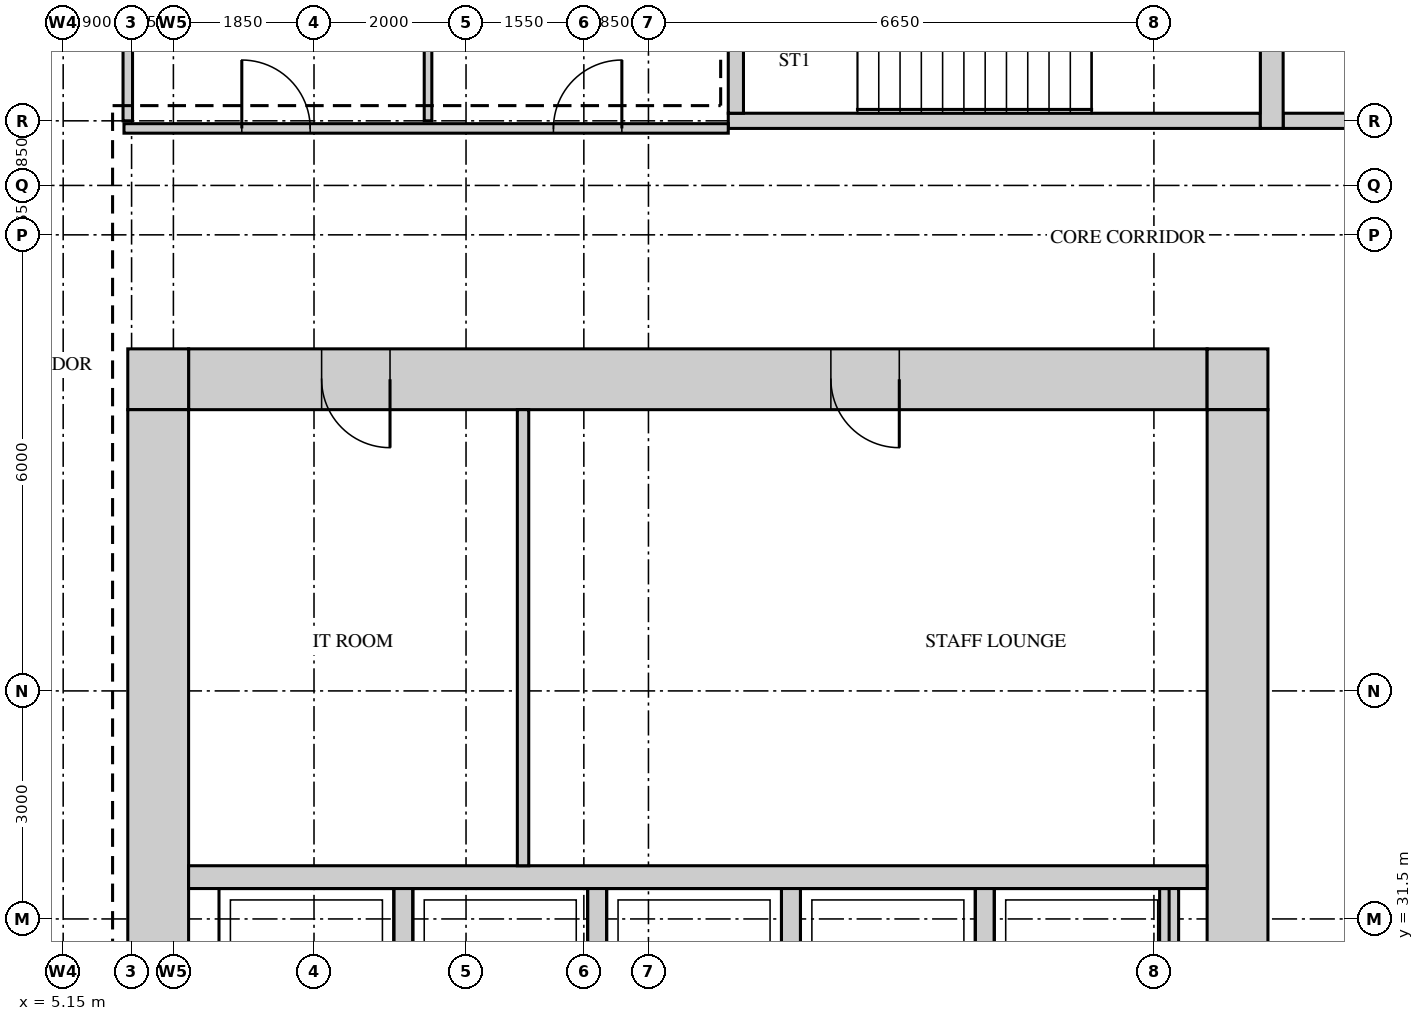
"""IFC4 building model, lengths in metres.
Left out: names, types, materials, properties, quantities, classifications, styles, units other than length and angle.
Written with IfcOpenShell. Run it as: python <this file> out.ifc"""

import sys

from ifc_helpers import new_model, si_unit, direction, frame, frame_2d, origin, place, context, subcontext, project, spatial, rectangle, extrude, source, transform, mapped, element, fill, save


model = new_model("IFC4")
c1 = context("Model", 3, precision=1e-05, world=origin(), true_north=direction((0.0, 1.0)))
c2 = subcontext(c1, "Body", "Model", "MODEL_VIEW")
j1 = project(units=[si_unit("LENGTHUNIT", "METRE"), si_unit("PLANEANGLEUNIT", "RADIAN")], contexts=[c1])
p1 = place(None, origin())
s1 = spatial("IfcSite", under=j1, at=p1, CompositionType="ELEMENT")
p2 = place(p1, origin())
s2 = spatial("IfcBuilding", under=s1, at=p2, CompositionType="ELEMENT")
p3 = place(p2, frame((0.0, 0.0, 192.7)))
s3 = spatial("IfcBuildingStorey", under=s2, at=p3, CompositionType="ELEMENT", Elevation=192.7)
m1 = source(origin(), c2, "Body", "SweptSolid", [
    extrude(rectangle(XDim=13.4, YDim=0.8, at=frame_2d((6.7, 0.0))), origin(), (0.0, 0.0, 1.0), 3.75),
])
p4 = place(p3, frame((6.8, 38.6, 0.0), z_axis=(0.0, 0.0, 1.0), x_axis=(1.0, 0.0, 0.0)))
e1 = element("IfcWall", 1, at=p4, inside=s3, PredefinedType="SHEAR", context=c2, shape_type="MappedRepresentation", body=[
    mapped(m1, transform((0.0, 0.0, 0.0))),
])
m2 = source(origin(), c2, "Body", "SweptSolid", [
    extrude(rectangle(XDim=0.9, YDim=2.1, at=frame_2d((0.45, 1.05))), frame((0.0, 0.41, 0.0), z_axis=(0.0, -1.0, 0.0), x_axis=(1.0, 0.0, 0.0)), (0.0, 0.0, 1.0), 0.82),
])
p5 = place(p4, frame((1.75, 0.0, 0.0)))
e2 = element("IfcOpeningElement", 2, at=p5, cuts=e1, PredefinedType="OPENING", context=c2, shape_type="MappedRepresentation", body=[
    mapped(m2, transform((0.0, 0.0, 0.0))),
])
p6 = place(p4, frame((8.45, 0.0, 0.0)))
e3 = element("IfcOpeningElement", 3, at=p6, cuts=e1, PredefinedType="OPENING", context=c2, shape_type="MappedRepresentation", body=[
    mapped(m2, transform((0.0, 0.0, 0.0))),
])
m3 = source(origin(), c2, "Body", "SweptSolid", [
    extrude(rectangle(XDim=0.8, YDim=0.8, at=frame_2d((0.4, 0.0))), origin(), (0.0, 0.0, 1.0), 3.75),
])
for number, where, z_axis, x_axis in (
    (4, (20.2, 38.6, 0.0), (0.0, 0.0, 1.0), (1.0, 0.0, 0.0)),
    (5, (6.0, 38.6, 0.0), (0.0, 0.0, 1.0), (1.0, 0.0, 0.0)),
):
    element("IfcWall", number, at=place(p3, frame(where, z_axis=z_axis, x_axis=x_axis)), inside=s3, PredefinedType="SHEAR", context=c2, shape_type="MappedRepresentation", body=[
        mapped(m3, transform((0.0, 0.0, 0.0))),
    ])
m4 = source(origin(), c2, "Body", "SweptSolid", [
    extrude(rectangle(XDim=22.4, YDim=0.8, at=frame_2d((11.2, 0.0))), origin(), (0.0, 0.0, 1.0), 3.75),
])
p7 = place(p3, frame((20.6, 15.8, 0.0), z_axis=(0.0, 0.0, 1.0), x_axis=(0.0, 1.0, 0.0)))
e6 = element("IfcWall", 6, at=p7, inside=s3, PredefinedType="SHEAR", context=c2, shape_type="MappedRepresentation", body=[
    mapped(m4, transform((0.0, 0.0, 0.0))),
])
m5 = source(origin(), c2, "Body", "SweptSolid", [
    extrude(rectangle(XDim=1.8, YDim=2.1, at=frame_2d((0.9, 1.05))), frame((0.0, 0.41, 0.0), z_axis=(0.0, -1.0, 0.0), x_axis=(1.0, 0.0, 0.0)), (0.0, 0.0, 1.0), 0.82),
])
p8 = place(p7, frame((10.7, 0.0, 0.0)))
e7 = element("IfcOpeningElement", 7, at=p8, cuts=e6, PredefinedType="OPENING", context=c2, shape_type="MappedRepresentation", body=[
    mapped(m5, transform((0.0, 0.0, 0.0))),
])
p9 = place(p7, frame((0.35, 0.0, 0.0)))
e8 = element("IfcOpeningElement", 8, at=p9, cuts=e6, PredefinedType="OPENING", context=c2, shape_type="MappedRepresentation", body=[
    mapped(m2, transform((0.0, 0.0, 0.0))),
])
p10 = place(p7, frame((2.15, 0.0, 0.0)))
e9 = element("IfcOpeningElement", 9, at=p10, cuts=e6, PredefinedType="OPENING", context=c2, shape_type="MappedRepresentation", body=[
    mapped(m2, transform((0.0, 0.0, 0.0))),
])
m6 = source(origin(), c2, "Body", "SweptSolid", [
    extrude(rectangle(XDim=1.0, YDim=2.1, at=frame_2d((0.5, 1.05))), frame((0.0, 0.41, 0.0), z_axis=(0.0, -1.0, 0.0), x_axis=(1.0, 0.0, 0.0)), (0.0, 0.0, 1.0), 0.82),
])
p11 = place(p7, frame((4.85, 0.0, 0.0)))
e10 = element("IfcOpeningElement", 10, at=p11, cuts=e6, PredefinedType="OPENING", context=c2, shape_type="MappedRepresentation", body=[
    mapped(m6, transform((0.0, 0.0, 0.0))),
])
p12 = place(p3, frame((6.4, 15.8, 0.0), z_axis=(0.0, 0.0, 1.0), x_axis=(0.0, 1.0, 0.0)))
e11 = element("IfcWall", 11, at=p12, inside=s3, PredefinedType="SHEAR", context=c2, shape_type="MappedRepresentation", body=[
    mapped(m4, transform((0.0, 0.0, 0.0))),
])
m7 = source(origin(), c2, "Body", "SweptSolid", [
    extrude(rectangle(XDim=7.0, YDim=0.2, at=frame_2d((3.5, 0.0))), origin(), (0.0, 0.0, 1.0), 3.75),
])
p13 = place(p3, frame((13.9, 42.0, 0.0), z_axis=(0.0, 0.0, 1.0), x_axis=(1.0, 0.0, 0.0)))
e12 = element("IfcWall", 12, at=p13, inside=s3, PredefinedType="SHEAR", context=c2, shape_type="MappedRepresentation", body=[
    mapped(m7, transform((0.0, 0.0, 0.0))),
])
m8 = source(origin(), c2, "Body", "SweptSolid", [
    extrude(rectangle(XDim=7.1, YDim=0.2, at=frame_2d((3.55, 0.0))), origin(), (0.0, 0.0, 1.0), 3.75),
])
p14 = place(p3, frame((21.2, 42.0, 0.0), z_axis=(0.0, 0.0, 1.0), x_axis=(1.0, 0.0, 0.0)))
e13 = element("IfcWall", 13, at=p14, inside=s3, PredefinedType="SHEAR", context=c2, shape_type="MappedRepresentation", body=[
    mapped(m8, transform((0.0, 0.0, 0.0))),
])
m9 = source(origin(), c2, "Body", "SweptSolid", [
    extrude(rectangle(XDim=3.75, YDim=0.3, at=frame_2d((1.875, 0.0))), origin(), (0.0, 0.0, 1.0), 3.75),
])
p15 = place(p3, frame((21.05, 41.9, 0.0), z_axis=(0.0, 0.0, 1.0), x_axis=(0.0, 1.0, 0.0)))
e14 = element("IfcWall", 14, at=p15, inside=s3, PredefinedType="SHEAR", context=c2, shape_type="MappedRepresentation", body=[
    mapped(m9, transform((0.0, 0.0, 0.0))),
])
m10 = source(origin(), c2, "Body", "SweptSolid", [
    extrude(rectangle(XDim=3.35, YDim=0.2, at=frame_2d((1.675, 0.0))), origin(), (0.0, 0.0, 1.0), 3.75),
])
p16 = place(p3, frame((14.0, 42.1, 0.0), z_axis=(0.0, 0.0, 1.0), x_axis=(0.0, 1.0, 0.0)))
e15 = element("IfcWall", 15, at=p16, inside=s3, PredefinedType="SHEAR", context=c2, shape_type="MappedRepresentation", body=[
    mapped(m10, transform((0.0, 0.0, 0.0))),
])
m11 = source(origin(), c2, "Body", "SweptSolid", [
    extrude(rectangle(XDim=13.4, YDim=0.3, at=frame_2d((6.7, 0.0))), origin(), (0.0, 0.0, 1.0), 3.75),
])
p17 = place(p3, frame((6.8, 32.05, 0.0), z_axis=(0.0, 0.0, 1.0), x_axis=(1.0, 0.0, 0.0)))
e16 = element("IfcWall", 16, at=p17, inside=s3, PredefinedType="STANDARD", context=c2, shape_type="MappedRepresentation", body=[
    mapped(m11, transform((0.0, 0.0, 0.0))),
])
m12 = source(origin(), c2, "Body", "SweptSolid", [
    extrude(rectangle(XDim=2.4, YDim=0.25, at=frame_2d((1.2, 0.0))), origin(), (0.0, 0.0, 1.0), 3.75),
])
for number, where, z_axis, x_axis in (
    (17, (17.275, 29.5, 0.0), (0.0, 0.0, 1.0), (0.0, 1.0, 0.0)),
    (18, (19.7, 29.5, 0.0), (0.0, 0.0, 1.0), (0.0, 1.0, 0.0)),
    (19, (9.625, 29.5, 0.0), (0.0, 0.0, 1.0), (0.0, 1.0, 0.0)),
    (20, (12.175, 29.5, 0.0), (0.0, 0.0, 1.0), (0.0, 1.0, 0.0)),
    (21, (14.725, 29.5, 0.0), (0.0, 0.0, 1.0), (0.0, 1.0, 0.0)),
):
    element("IfcWall", number, at=place(p3, frame(where, z_axis=z_axis, x_axis=x_axis)), inside=s3, PredefinedType="STANDARD", context=c2, shape_type="MappedRepresentation", body=[
        mapped(m12, transform((0.0, 0.0, 0.0))),
    ])
m13 = source(origin(), c2, "Body", "SweptSolid", [
    extrude(rectangle(XDim=6.0, YDim=0.15, at=frame_2d((3.0, 0.0))), origin(), (0.0, 0.0, 1.0), 3.8),
])
p18 = place(p3, frame((11.2, 32.2, 0.0), z_axis=(0.0, 0.0, 1.0), x_axis=(0.0, 1.0, 0.0)))
e22 = element("IfcWall", 22, at=p18, inside=s3, PredefinedType="PARTITIONING", context=c2, shape_type="MappedRepresentation", body=[
    mapped(m13, transform((0.0, 0.0, 0.0))),
])
m14 = source(origin(), c2, "Body", "SweptSolid", [
    extrude(rectangle(XDim=7.95, YDim=0.125, at=frame_2d((3.975, 0.0))), origin(), (0.0, 0.0, 1.0), 3.8),
])
p19 = place(p3, frame((5.95, 41.9, 0.0), z_axis=(0.0, 0.0, 1.0), x_axis=(1.0, 0.0, 0.0)))
e23 = element("IfcWall", 23, at=p19, inside=s3, PredefinedType="PARTITIONING", context=c2, shape_type="MappedRepresentation", body=[
    mapped(m14, transform((0.0, 0.0, 0.0))),
])
m15 = source(origin(), c2, "Body", "SweptSolid", [
    extrude(rectangle(XDim=0.9, YDim=2.1, at=frame_2d((0.45, 1.05))), frame((0.0, 0.073, 0.0), z_axis=(0.0, -1.0, 0.0), x_axis=(1.0, 0.0, 0.0)), (0.0, 0.0, 1.0), 0.145),
])
p20 = place(p19, frame((1.55, 0.0, 0.0)))
e24 = element("IfcOpeningElement", 24, at=p20, cuts=e23, PredefinedType="OPENING", context=c2, shape_type="MappedRepresentation", body=[
    mapped(m15, transform((0.0, 0.0, 0.0))),
])
p21 = place(p19, frame((5.65, 0.0, 0.0)))
e25 = element("IfcOpeningElement", 25, at=p21, cuts=e23, PredefinedType="OPENING", context=c2, shape_type="MappedRepresentation", body=[
    mapped(m15, transform((0.0, 0.0, 0.0))),
])
m16 = source(origin(), c2, "Body", "SweptSolid", [
    extrude(rectangle(XDim=3.45, YDim=0.125, at=frame_2d((1.725, 0.0))), origin(), (0.0, 0.0, 1.0), 3.8),
])
p22 = place(p3, frame((6.0, 42.0, 0.0), z_axis=(0.0, 0.0, 1.0), x_axis=(0.0, 1.0, 0.0)))
e26 = element("IfcWall", 26, at=p22, inside=s3, PredefinedType="PARTITIONING", context=c2, shape_type="MappedRepresentation", body=[
    mapped(m16, transform((0.0, 0.0, 0.0))),
])
m17 = source(origin(), c2, "Body", "SweptSolid", [
    extrude(rectangle(XDim=3.45, YDim=0.1, at=frame_2d((1.725, 0.0))), origin(), (0.0, 0.0, 1.0), 3.8),
])
p23 = place(p3, frame((9.95, 42.0, 0.0), z_axis=(0.0, 0.0, 1.0), x_axis=(0.0, 1.0, 0.0)))
e27 = element("IfcWall", 27, at=p23, inside=s3, PredefinedType="PARTITIONING", context=c2, shape_type="MappedRepresentation", body=[
    mapped(m17, transform((0.0, 0.0, 0.0))),
])
m18 = source(origin(), c2, "Body", "SweptSolid", [
    extrude(rectangle(XDim=0.9, YDim=2.1, at=frame_2d((0.45, 1.05))), frame((0.0, 0.35, 0.0), z_axis=(0.0, -1.0, 0.0), x_axis=(1.0, 0.0, 0.0)), (0.0, 0.0, 1.0), 0.7),
])
p24 = place(p5, origin())
e28 = element("IfcDoor", 28, at=p24, inside=s3, OperationType="SINGLE_SWING_RIGHT", PredefinedType="DOOR", context=c2, shape_type="MappedRepresentation", body=[
    mapped(m18, transform((0.0, 0.0, 0.0))),
])
fill(e2, e28)
p25 = place(p6, origin())
e29 = element("IfcDoor", 29, at=p25, inside=s3, OperationType="SINGLE_SWING_RIGHT", PredefinedType="DOOR", context=c2, shape_type="MappedRepresentation", body=[
    mapped(m18, transform((0.0, 0.0, 0.0))),
])
fill(e3, e29)
m19 = source(origin(), c2, "Body", "SweptSolid", [
    extrude(rectangle(XDim=0.9, YDim=2.1, at=frame_2d((0.45, 1.05))), frame((0.0, 0.025, 0.0), z_axis=(0.0, -1.0, 0.0), x_axis=(1.0, 0.0, 0.0)), (0.0, 0.0, 1.0), 0.05),
])
p26 = place(p20, origin())
e30 = element("IfcDoor", 30, at=p26, inside=s3, OperationType="SINGLE_SWING_RIGHT", PredefinedType="DOOR", context=c2, shape_type="MappedRepresentation", body=[
    mapped(m19, transform((0.0, 0.0, 0.0))),
])
fill(e24, e30)
p27 = place(p21, origin())
e31 = element("IfcDoor", 31, at=p27, inside=s3, OperationType="SINGLE_SWING_LEFT", PredefinedType="DOOR", context=c2, shape_type="MappedRepresentation", body=[
    mapped(m19, transform((0.0, 0.0, 0.0))),
])
fill(e25, e31)
save(model, sys.argv[1])
